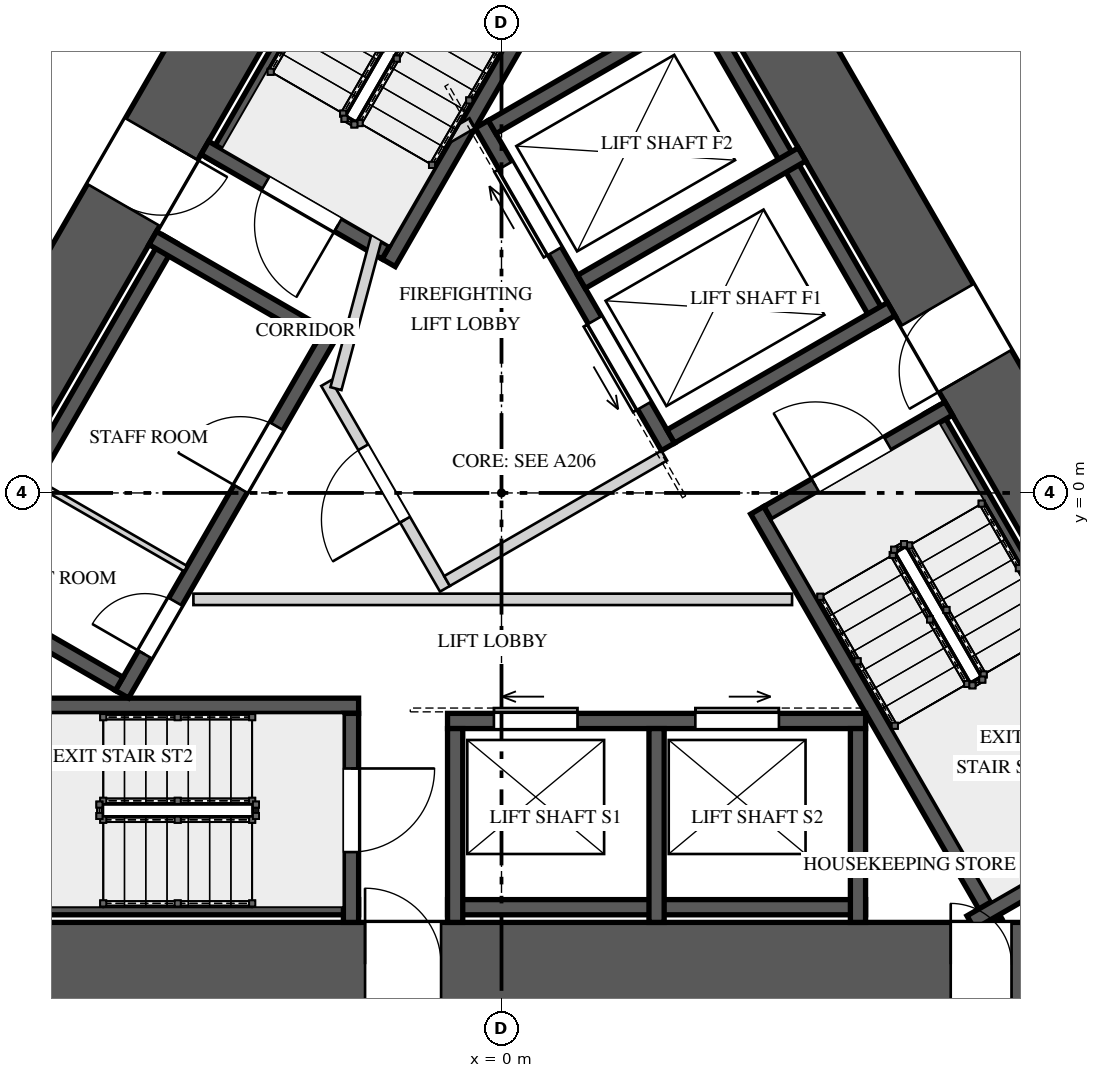
"""IFC4 building model, lengths in metres.
Left out: names, types, materials, properties, quantities, classifications, styles, units other than length and angle.
Written with IfcOpenShell. Run it as: python <this file> out.ifc"""

import sys

from ifc_helpers import new_model, si_unit, direction, frame, frame_2d, origin, place, context, subcontext, project, spatial, rectangle, extrude, element, fill, save


model = new_model("IFC4")
c1 = context("Model", 3, precision=1e-05, world=origin(), true_north=direction((0.0, 1.0)))
c2 = subcontext(c1, "Body", "Model", "MODEL_VIEW")
j1 = project(units=[si_unit("LENGTHUNIT", "METRE"), si_unit("PLANEANGLEUNIT", "RADIAN")], contexts=[c1])
p1 = place(None, origin())
s1 = spatial("IfcSite", under=j1, at=p1, CompositionType="ELEMENT")
p2 = place(p1, origin())
s2 = spatial("IfcBuilding", under=s1, at=p2, CompositionType="ELEMENT")
p3 = place(p2, frame((0.0, 0.0, 25.0)))
s3 = spatial("IfcBuildingStorey", under=s2, at=p3, CompositionType="ELEMENT", Elevation=25.0)
p4 = place(p3, frame((-1.126, 10.45, 0.0), z_axis=(0.0, 0.0, 1.0), x_axis=(-0.500001757713, -0.866024388966, 0.0)))
e1 = element("IfcWall", 1, at=p4, inside=s3, PredefinedType="SHEAR", context=c2, shape_type="SweptSolid", body=[
    extrude(rectangle(XDim=16.974, YDim=1.1, at=frame_2d((8.487, 0.0))), origin(), (0.0, 0.0, 1.0), 5.0),
])
p5 = place(p4, frame((6.692, 0.0, 0.0)))
e2 = element("IfcOpeningElement", 2, at=p5, cuts=e1, PredefinedType="OPENING", context=c2, shape_type="SweptSolid", body=[
    extrude(rectangle(XDim=1.0, YDim=2.4, at=frame_2d((0.5, 1.2))), frame((0.0, 0.56, 0.0), z_axis=(0.0, -1.0, 0.0), x_axis=(1.0, 0.0, 0.0)), (0.0, 0.0, 1.0), 1.12),
])
p6 = place(p3, frame((-8.487, -6.2, 0.0), z_axis=(0.0, 0.0, 1.0), x_axis=(1.0, 0.0, 0.0)))
e3 = element("IfcWall", 3, at=p6, inside=s3, PredefinedType="SHEAR", context=c2, shape_type="SweptSolid", body=[
    extrude(rectangle(XDim=16.974, YDim=1.1, at=frame_2d((8.487, 0.0))), origin(), (0.0, 0.0, 1.0), 5.0),
])
p7 = place(p6, frame((6.692, 0.0, 0.0)))
e4 = element("IfcOpeningElement", 4, at=p7, cuts=e3, PredefinedType="OPENING", context=c2, shape_type="SweptSolid", body=[
    extrude(rectangle(XDim=1.0, YDim=2.4, at=frame_2d((0.5, 1.2))), frame((0.0, 0.56, 0.0), z_axis=(0.0, -1.0, 0.0), x_axis=(1.0, 0.0, 0.0)), (0.0, 0.0, 1.0), 1.12),
])
p8 = place(p6, frame((14.397, 0.0, 0.0)))
e5 = element("IfcOpeningElement", 5, at=p8, cuts=e3, PredefinedType="OPENING", context=c2, shape_type="SweptSolid", body=[
    extrude(rectangle(XDim=0.8, YDim=2.1, at=frame_2d((0.4, 1.05))), frame((0.0, 0.56, 0.0), z_axis=(0.0, -1.0, 0.0), x_axis=(1.0, 0.0, 0.0)), (0.0, 0.0, 1.0), 1.12),
])
p9 = place(p3, frame((9.613, -4.25, 0.0), z_axis=(0.0, 0.0, 1.0), x_axis=(-0.500001757713, 0.866024388966, 0.0)))
e6 = element("IfcWall", 6, at=p9, inside=s3, PredefinedType="SHEAR", context=c2, shape_type="SweptSolid", body=[
    extrude(rectangle(XDim=16.974, YDim=1.1, at=frame_2d((8.487, 0.0))), origin(), (0.0, 0.0, 1.0), 5.0),
])
p10 = place(p9, frame((6.762, 0.0, 0.0)))
e7 = element("IfcOpeningElement", 7, at=p10, cuts=e6, PredefinedType="OPENING", context=c2, shape_type="SweptSolid", body=[
    extrude(rectangle(XDim=1.0, YDim=2.4, at=frame_2d((0.5, 1.2))), frame((0.0, 0.56, 0.0), z_axis=(0.0, -1.0, 0.0), x_axis=(1.0, 0.0, 0.0)), (0.0, 0.0, 1.0), 1.12),
])
p11 = place(p9, frame((13.889, 0.0, 0.0)))
e8 = element("IfcOpeningElement", 8, at=p11, cuts=e6, PredefinedType="OPENING", context=c2, shape_type="SweptSolid", body=[
    extrude(rectangle(XDim=0.8, YDim=2.1, at=frame_2d((0.4, 1.05))), frame((0.0, 0.56, 0.0), z_axis=(0.0, -1.0, 0.0), x_axis=(1.0, 0.0, 0.0)), (0.0, 0.0, 1.0), 1.12),
])
p12 = place(p3, frame((-0.68, 9.722, 0.0), z_axis=(0.0, 0.0, 1.0), x_axis=(-0.49998037582, -0.866036733513, 0.0)))
e9 = element("IfcWall", 9, at=p12, inside=s3, PredefinedType="SOLIDWALL", context=c2, shape_type="SweptSolid", body=[
    extrude(rectangle(XDim=6.2, YDim=0.2, at=frame_2d((3.1, 0.0))), origin(), (0.0, 0.0, 1.0), 4.65),
])
p13 = place(p3, frame((1.646, 8.45, 0.0), z_axis=(0.0, 0.0, 1.0), x_axis=(-0.500006002103, -0.866021938441, 0.0)))
e10 = element("IfcWall", 10, at=p13, inside=s3, PredefinedType="SOLIDWALL", context=c2, shape_type="SweptSolid", body=[
    extrude(rectangle(XDim=6.261, YDim=0.2, at=frame_2d((3.13, 0.0))), origin(), (0.0, 0.0, 1.0), 4.65),
])
p14 = place(p3, frame((-1.521, 3.165, 0.0), z_axis=(0.0, 0.0, 1.0), x_axis=(-0.866027397988, 0.499996545922, 0.0)))
e11 = element("IfcWall", 11, at=p14, inside=s3, PredefinedType="SOLIDWALL", context=c2, shape_type="SweptSolid", body=[
    extrude(rectangle(XDim=2.75, YDim=0.2, at=frame_2d((1.375, 0.0))), origin(), (0.0, 0.0, 1.0), 4.65),
])
p15 = place(p14, frame((0.725, 0.0, 0.0)))
e12 = element("IfcOpeningElement", 12, at=p15, cuts=e11, PredefinedType="OPENING", context=c2, shape_type="SweptSolid", body=[
    extrude(rectangle(XDim=1.1, YDim=2.4, at=frame_2d((0.55, 1.2))), frame((0.0, 0.11, 0.0), z_axis=(0.0, -1.0, 0.0), x_axis=(1.0, 0.0, 0.0)), (0.0, 0.0, 1.0), 0.22),
])
p16 = place(p3, frame((-8.08, -5.45, 0.0), z_axis=(0.0, 0.0, 1.0), x_axis=(1.0, 0.0, 0.0)))
e13 = element("IfcWall", 13, at=p16, inside=s3, PredefinedType="SOLIDWALL", context=c2, shape_type="SweptSolid", body=[
    extrude(rectangle(XDim=6.2, YDim=0.2, at=frame_2d((3.1, 0.0))), origin(), (0.0, 0.0, 1.0), 4.65),
])
p17 = place(p3, frame((-8.141, -2.8, 0.0), z_axis=(0.0, 0.0, 1.0), x_axis=(1.0, 0.0, 0.0)))
e14 = element("IfcWall", 14, at=p17, inside=s3, PredefinedType="SOLIDWALL", context=c2, shape_type="SweptSolid", body=[
    extrude(rectangle(XDim=6.261, YDim=0.2, at=frame_2d((3.13, 0.0))), origin(), (0.0, 0.0, 1.0), 4.65),
])
p18 = place(p3, frame((-1.98, -2.9, 0.0), z_axis=(0.0, 0.0, 1.0), x_axis=(0.0, -1.0, 0.0)))
e15 = element("IfcWall", 15, at=p18, inside=s3, PredefinedType="SOLIDWALL", context=c2, shape_type="SweptSolid", body=[
    extrude(rectangle(XDim=2.75, YDim=0.2, at=frame_2d((1.375, 0.0))), origin(), (0.0, 0.0, 1.0), 4.65),
])
p19 = place(p18, frame((0.725, 0.0, 0.0)))
e16 = element("IfcOpeningElement", 16, at=p19, cuts=e15, PredefinedType="OPENING", context=c2, shape_type="SweptSolid", body=[
    extrude(rectangle(XDim=1.1, YDim=2.4, at=frame_2d((0.55, 1.2))), frame((0.0, 0.11, 0.0), z_axis=(0.0, -1.0, 0.0), x_axis=(1.0, 0.0, 0.0)), (0.0, 0.0, 1.0), 0.22),
])
p20 = place(p3, frame((8.76, -4.272, 0.0), z_axis=(0.0, 0.0, 1.0), x_axis=(-0.49998037582, 0.866036733513, 0.0)))
e17 = element("IfcWall", 17, at=p20, inside=s3, PredefinedType="SOLIDWALL", context=c2, shape_type="SweptSolid", body=[
    extrude(rectangle(XDim=6.2, YDim=0.2, at=frame_2d((3.1, 0.0))), origin(), (0.0, 0.0, 1.0), 4.65),
])
p21 = place(p3, frame((6.495, -5.65, 0.0), z_axis=(0.0, 0.0, 1.0), x_axis=(-0.499976754523, 0.866038824151, 0.0)))
e18 = element("IfcWall", 18, at=p21, inside=s3, PredefinedType="SOLIDWALL", context=c2, shape_type="SweptSolid", body=[
    extrude(rectangle(XDim=6.26, YDim=0.2, at=frame_2d((3.13, 0.0))), origin(), (0.0, 0.0, 1.0), 4.65),
])
p22 = place(p3, frame((6.174, -5.65, 0.0), z_axis=(0.0, 0.0, 1.0), x_axis=(0.866054327916, 0.499949898588, 0.0)))
e19 = element("IfcWall", 19, at=p22, inside=s3, PredefinedType="SOLIDWALL", context=c2, shape_type="SweptSolid", body=[
    extrude(rectangle(XDim=3.128, YDim=0.2, at=frame_2d((1.564, 0.0))), origin(), (0.0, 0.0, 1.0), 4.65),
])
p23 = place(p3, frame((3.501, -0.265, 0.0), z_axis=(0.0, 0.0, 1.0), x_axis=(0.866027397988, 0.499996545922, 0.0)))
e20 = element("IfcWall", 20, at=p23, inside=s3, PredefinedType="SOLIDWALL", context=c2, shape_type="SweptSolid", body=[
    extrude(rectangle(XDim=2.75, YDim=0.2, at=frame_2d((1.375, 0.0))), origin(), (0.0, 0.0, 1.0), 4.65),
])
p24 = place(p23, frame((0.725, 0.0, 0.0)))
e21 = element("IfcOpeningElement", 21, at=p24, cuts=e20, PredefinedType="OPENING", context=c2, shape_type="SweptSolid", body=[
    extrude(rectangle(XDim=1.1, YDim=2.4, at=frame_2d((0.55, 1.2))), frame((0.0, 0.11, 0.0), z_axis=(0.0, -1.0, 0.0), x_axis=(1.0, 0.0, 0.0)), (0.0, 0.0, 1.0), 0.22),
])
p25 = place(p3, frame((-4.993, -2.648, 0.0), z_axis=(0.0, 0.0, 1.0), x_axis=(0.499996545922, 0.866027397988, 0.0)))
e22 = element("IfcWall", 22, at=p25, inside=s3, PredefinedType="SOLIDWALL", context=c2, shape_type="SweptSolid", body=[
    extrude(rectangle(XDim=5.5, YDim=0.2, at=frame_2d((2.75, 0.0))), origin(), (0.0, 0.0, 1.0), 4.65),
])
p26 = place(p25, frame((3.12, 0.0, 0.0)))
e23 = element("IfcOpeningElement", 23, at=p26, cuts=e22, PredefinedType="OPENING", context=c2, shape_type="SweptSolid", body=[
    extrude(rectangle(XDim=0.95, YDim=2.4, at=frame_2d((0.475, 1.2))), frame((0.0, 0.11, 0.0), z_axis=(0.0, -1.0, 0.0), x_axis=(1.0, 0.0, 0.0)), (0.0, 0.0, 1.0), 0.22),
])
p27 = place(p25, frame((0.605, 0.0, 0.0)))
e24 = element("IfcOpeningElement", 24, at=p27, cuts=e22, PredefinedType="OPENING", context=c2, shape_type="SweptSolid", body=[
    extrude(rectangle(XDim=0.8, YDim=2.1, at=frame_2d((0.4, 1.05))), frame((0.0, 0.11, 0.0), z_axis=(0.0, -1.0, 0.0), x_axis=(1.0, 0.0, 0.0)), (0.0, 0.0, 1.0), 0.22),
])
p28 = place(p3, frame((-4.365, 3.34, 0.0), z_axis=(0.0, 0.0, 1.0), x_axis=(-0.499996545922, -0.866027397988, 0.0)))
e25 = element("IfcWall", 25, at=p28, inside=s3, PredefinedType="SOLIDWALL", context=c2, shape_type="SweptSolid", body=[
    extrude(rectangle(XDim=5.5, YDim=0.2, at=frame_2d((2.75, 0.0))), origin(), (0.0, 0.0, 1.0), 4.65),
])
for number, where, z_axis, x_axis in (
    (26, (-2.38, 2.078, 0.0), (0.0, 0.0, 1.0), (-0.866, 0.5, 0.0)),
    (27, (-5.03, -2.512, 0.0), (0.0, 0.0, 1.0), (-0.866, 0.5, 0.0)),
):
    element("IfcWall", number, at=place(p3, frame(where, z_axis=z_axis, x_axis=x_axis)), inside=s3, PredefinedType="SOLIDWALL", context=c2, shape_type="SweptSolid", body=[
        extrude(rectangle(XDim=2.55, YDim=0.2, at=frame_2d((1.275, 0.0))), origin(), (0.0, 0.0, 1.0), 4.65),
    ])
p29 = place(p3, frame((-4.155, -0.996, 0.0), z_axis=(0.0, 0.0, 1.0), x_axis=(-0.866016039709, 0.500016218704, 0.0)))
e28 = element("IfcWall", 28, at=p29, inside=s3, PredefinedType="PARTITIONING", context=c2, shape_type="SweptSolid", body=[
    extrude(rectangle(XDim=2.35, YDim=0.08, at=frame_2d((1.175, 0.0))), origin(), (0.0, 0.0, 1.0), 4.65),
])
p30 = place(p3, frame((-0.71, -3.0, 0.0), z_axis=(0.0, 0.0, 1.0), x_axis=(1.0, 0.0, 0.0)))
e29 = element("IfcWall", 29, at=p30, inside=s3, PredefinedType="SOLIDWALL", context=c2, shape_type="SweptSolid", body=[
    extrude(rectangle(XDim=5.5, YDim=0.2, at=frame_2d((2.75, 0.0))), origin(), (0.0, 0.0, 1.0), 4.65),
])
p31 = place(p30, frame((0.61, 0.0, 0.0)))
e30 = element("IfcOpeningElement", 30, at=p31, cuts=e29, PredefinedType="OPENING", context=c2, shape_type="SweptSolid", body=[
    extrude(rectangle(XDim=1.1, YDim=2.1, at=frame_2d((0.55, 1.05))), frame((0.0, 0.11, 0.0), z_axis=(0.0, -1.0, 0.0), x_axis=(1.0, 0.0, 0.0)), (0.0, 0.0, 1.0), 0.22),
])
p32 = place(p30, frame((3.26, 0.0, 0.0)))
e31 = element("IfcOpeningElement", 31, at=p32, cuts=e29, PredefinedType="OPENING", context=c2, shape_type="SweptSolid", body=[
    extrude(rectangle(XDim=1.1, YDim=2.1, at=frame_2d((0.55, 1.05))), frame((0.0, 0.11, 0.0), z_axis=(0.0, -1.0, 0.0), x_axis=(1.0, 0.0, 0.0)), (0.0, 0.0, 1.0), 0.22),
])
p33 = place(p3, frame((-0.71, -5.45, 0.0), z_axis=(0.0, 0.0, 1.0), x_axis=(1.0, 0.0, 0.0)))
e32 = element("IfcWall", 32, at=p33, inside=s3, PredefinedType="SOLIDWALL", context=c2, shape_type="SweptSolid", body=[
    extrude(rectangle(XDim=5.5, YDim=0.2, at=frame_2d((2.75, 0.0))), origin(), (0.0, 0.0, 1.0), 4.65),
])
for number, where, z_axis, x_axis in (
    (33, (-0.61, -3.1, 0.0), (0.0, 0.0, 1.0), (0.0, -1.0, 0.0)),
    (34, (2.04, -3.1, 0.0), (0.0, 0.0, 1.0), (0.0, -1.0, 0.0)),
    (35, (4.69, -3.1, 0.0), (0.0, 0.0, 1.0), (0.0, -1.0, 0.0)),
):
    element("IfcWall", number, at=place(p3, frame(where, z_axis=z_axis, x_axis=x_axis)), inside=s3, PredefinedType="SOLIDWALL", context=c2, shape_type="SweptSolid", body=[
        extrude(rectangle(XDim=2.55, YDim=0.2, at=frame_2d((1.275, 0.0))), origin(), (0.0, 0.0, 1.0), 4.65),
    ])
p34 = place(p3, frame((2.19, 0.606, 0.0), z_axis=(0.0, 0.0, 1.0), x_axis=(-0.500002801628, 0.866023786258, 0.0)))
e36 = element("IfcWall", 36, at=p34, inside=s3, PredefinedType="SOLIDWALL", context=c2, shape_type="SweptSolid", body=[
    extrude(rectangle(XDim=4.9, YDim=0.2, at=frame_2d((2.45, 0.0))), origin(), (0.0, 0.0, 1.0), 4.65),
])
p35 = place(p34, frame((0.625, 0.0, 0.0)))
e37 = element("IfcOpeningElement", 37, at=p35, cuts=e36, PredefinedType="OPENING", context=c2, shape_type="SweptSolid", body=[
    extrude(rectangle(XDim=1.3, YDim=2.1, at=frame_2d((0.65, 1.05))), frame((0.0, 0.11, 0.0), z_axis=(0.0, -1.0, 0.0), x_axis=(1.0, 0.0, 0.0)), (0.0, 0.0, 1.0), 0.22),
])
p36 = place(p34, frame((2.975, 0.0, 0.0)))
e38 = element("IfcOpeningElement", 38, at=p36, cuts=e36, PredefinedType="OPENING", context=c2, shape_type="SweptSolid", body=[
    extrude(rectangle(XDim=1.3, YDim=2.1, at=frame_2d((0.65, 1.05))), frame((0.0, 0.11, 0.0), z_axis=(0.0, -1.0, 0.0), x_axis=(1.0, 0.0, 0.0)), (0.0, 0.0, 1.0), 0.22),
])
p37 = place(p3, frame((5.005, 2.231, 0.0), z_axis=(0.0, 0.0, 1.0), x_axis=(-0.500002801628, 0.866023786258, 0.0)))
e39 = element("IfcWall", 39, at=p37, inside=s3, PredefinedType="SOLIDWALL", context=c2, shape_type="SweptSolid", body=[
    extrude(rectangle(XDim=4.9, YDim=0.2, at=frame_2d((2.45, 0.0))), origin(), (0.0, 0.0, 1.0), 4.65),
])
p38 = place(p3, frame((2.227, 0.743, 0.0), z_axis=(0.0, 0.0, 1.0), x_axis=(0.866014461049, 0.500018952895, 0.0)))
e40 = element("IfcWall", 40, at=p38, inside=s3, PredefinedType="SOLIDWALL", context=c2, shape_type="SweptSolid", body=[
    extrude(rectangle(XDim=3.35, YDim=0.2, at=frame_2d((1.675, 0.0))), origin(), (0.0, 0.0, 1.0), 4.65),
])
p39 = place(p3, frame((1.052, 2.778, 0.0), z_axis=(0.0, 0.0, 1.0), x_axis=(0.866032680314, 0.499987396469, 0.0)))
e41 = element("IfcWall", 41, at=p39, inside=s3, PredefinedType="SOLIDWALL", context=c2, shape_type="SweptSolid", body=[
    extrude(rectangle(XDim=3.35, YDim=0.2, at=frame_2d((1.675, 0.0))), origin(), (0.0, 0.0, 1.0), 4.65),
])
p40 = place(p3, frame((-0.123, 4.813, 0.0), z_axis=(0.0, 0.0, 1.0), x_axis=(0.866014461049, 0.500018952895, 0.0)))
e42 = element("IfcWall", 42, at=p40, inside=s3, PredefinedType="SOLIDWALL", context=c2, shape_type="SweptSolid", body=[
    extrude(rectangle(XDim=3.35, YDim=0.2, at=frame_2d((1.675, 0.0))), origin(), (0.0, 0.0, 1.0), 4.65),
])
p41 = place(p3, frame((-0.744, -1.261, 0.0), z_axis=(0.0, 0.0, 1.0), x_axis=(-0.500004234368, 0.866022959057, 0.0)))
e43 = element("IfcWall", 43, at=p41, inside=s3, PredefinedType="PARTITIONING", context=c2, shape_type="SweptSolid", body=[
    extrude(rectangle(XDim=3.125, YDim=0.15, at=frame_2d((1.562, 0.0))), origin(), (0.0, 0.0, 1.0), 4.65),
])
p42 = place(p41, frame((1.05, 0.0, 0.0)))
e44 = element("IfcOpeningElement", 44, at=p42, cuts=e43, PredefinedType="OPENING", context=c2, shape_type="SweptSolid", body=[
    extrude(rectangle(XDim=1.1, YDim=2.4, at=frame_2d((0.55, 1.2))), frame((0.0, 0.085, 0.0), z_axis=(0.0, -1.0, 0.0), x_axis=(1.0, 0.0, 0.0)), (0.0, 0.0, 1.0), 0.17),
])
p43 = place(p3, frame((-0.717, -1.159, 0.0), z_axis=(0.0, 0.0, 1.0), x_axis=(0.866008176907, 0.50002983664, 0.0)))
e45 = element("IfcWall", 45, at=p43, inside=s3, PredefinedType="PARTITIONING", context=c2, shape_type="SweptSolid", body=[
    extrude(rectangle(XDim=3.3, YDim=0.15, at=frame_2d((1.65, 0.0))), origin(), (0.0, 0.0, 1.0), 4.65),
])
p44 = place(p3, frame((-2.178, 1.372, 0.0), z_axis=(0.0, 0.0, 1.0), x_axis=(0.258808958833, 0.96592852884, 0.0)))
e46 = element("IfcWall", 46, at=p44, inside=s3, PredefinedType="PARTITIONING", context=c2, shape_type="SweptSolid", body=[
    extrude(rectangle(XDim=2.903, YDim=0.15, at=frame_2d((1.451, 0.0))), origin(), (0.0, 0.0, 1.0), 4.65),
])
p45 = place(p3, frame((-1.51, 4.215, 0.0), z_axis=(0.0, 0.0, 1.0), x_axis=(0.866085525409, 0.49989585183, 0.0)))
e47 = element("IfcWall", 47, at=p45, inside=s3, PredefinedType="PARTITIONING", context=c2, shape_type="SweptSolid", body=[
    extrude(rectangle(XDim=1.3, YDim=0.15, at=frame_2d((0.65, 0.0))), origin(), (0.0, 0.0, 1.0), 4.65),
])
p46 = place(p3, frame((-4.053, -1.4, 0.0), z_axis=(0.0, 0.0, 1.0), x_axis=(1.0, 0.0, 0.0)))
e48 = element("IfcWall", 48, at=p46, inside=s3, PredefinedType="PARTITIONING", context=c2, shape_type="SweptSolid", body=[
    extrude(rectangle(XDim=7.876, YDim=0.15, at=frame_2d((3.938, 0.0))), origin(), (0.0, 0.0, 1.0), 4.65),
])
p47 = place(p15, origin())
e49 = element("IfcDoor", 49, at=p47, inside=s3, OperationType="SINGLE_SWING_RIGHT", PredefinedType="DOOR", context=c2, shape_type="SweptSolid", body=[
    extrude(rectangle(XDim=1.1, YDim=2.4, at=frame_2d((0.55, 1.2))), frame((0.0, 0.025, 0.0), z_axis=(0.0, -1.0, 0.0), x_axis=(1.0, 0.0, 0.0)), (0.0, 0.0, 1.0), 0.05),
])
fill(e12, e49)
p48 = place(p19, origin())
e50 = element("IfcDoor", 50, at=p48, inside=s3, OperationType="SINGLE_SWING_LEFT", PredefinedType="DOOR", context=c2, shape_type="SweptSolid", body=[
    extrude(rectangle(XDim=1.1, YDim=2.4, at=frame_2d((0.55, 1.2))), frame((0.0, 0.025, 0.0), z_axis=(0.0, -1.0, 0.0), x_axis=(1.0, 0.0, 0.0)), (0.0, 0.0, 1.0), 0.05),
])
fill(e16, e50)
p49 = place(p24, origin())
e51 = element("IfcDoor", 51, at=p49, inside=s3, OperationType="SINGLE_SWING_RIGHT", PredefinedType="DOOR", context=c2, shape_type="SweptSolid", body=[
    extrude(rectangle(XDim=1.1, YDim=2.4, at=frame_2d((0.55, 1.2))), frame((0.0, 0.025, 0.0), z_axis=(0.0, -1.0, 0.0), x_axis=(1.0, 0.0, 0.0)), (0.0, 0.0, 1.0), 0.05),
])
fill(e21, e51)
p50 = place(p26, origin())
e52 = element("IfcDoor", 52, at=p50, inside=s3, OperationType="SINGLE_SWING_LEFT", PredefinedType="DOOR", context=c2, shape_type="SweptSolid", body=[
    extrude(rectangle(XDim=0.95, YDim=2.4, at=frame_2d((0.475, 1.2))), frame((0.0, 0.025, 0.0), z_axis=(0.0, -1.0, 0.0), x_axis=(1.0, 0.0, 0.0)), (0.0, 0.0, 1.0), 0.05),
])
fill(e23, e52)
p51 = place(p27, origin())
e53 = element("IfcDoor", 53, at=p51, inside=s3, OperationType="SINGLE_SWING_RIGHT", PredefinedType="DOOR", context=c2, shape_type="SweptSolid", body=[
    extrude(rectangle(XDim=0.8, YDim=2.1, at=frame_2d((0.4, 1.05))), frame((0.0, 0.025, 0.0), z_axis=(0.0, -1.0, 0.0), x_axis=(1.0, 0.0, 0.0)), (0.0, 0.0, 1.0), 0.05),
])
fill(e24, e53)
p52 = place(p31, origin())
e54 = element("IfcDoor", 54, at=p52, inside=s3, OperationType="SLIDING_TO_LEFT", PredefinedType="DOOR", context=c2, shape_type="SweptSolid", body=[
    extrude(rectangle(XDim=1.1, YDim=2.1, at=frame_2d((0.55, 1.05))), frame((0.0, 0.025, 0.0), z_axis=(0.0, -1.0, 0.0), x_axis=(1.0, 0.0, 0.0)), (0.0, 0.0, 1.0), 0.05),
])
fill(e30, e54)
p53 = place(p32, origin())
e55 = element("IfcDoor", 55, at=p53, inside=s3, OperationType="SLIDING_TO_RIGHT", PredefinedType="DOOR", context=c2, shape_type="SweptSolid", body=[
    extrude(rectangle(XDim=1.1, YDim=2.1, at=frame_2d((0.55, 1.05))), frame((0.0, 0.025, 0.0), z_axis=(0.0, -1.0, 0.0), x_axis=(1.0, 0.0, 0.0)), (0.0, 0.0, 1.0), 0.05),
])
fill(e31, e55)
p54 = place(p35, origin())
e56 = element("IfcDoor", 56, at=p54, inside=s3, OperationType="SLIDING_TO_LEFT", PredefinedType="DOOR", context=c2, shape_type="SweptSolid", body=[
    extrude(rectangle(XDim=1.3, YDim=2.1, at=frame_2d((0.65, 1.05))), frame((0.0, 0.025, 0.0), z_axis=(0.0, -1.0, 0.0), x_axis=(1.0, 0.0, 0.0)), (0.0, 0.0, 1.0), 0.05),
])
fill(e37, e56)
p55 = place(p36, origin())
e57 = element("IfcDoor", 57, at=p55, inside=s3, OperationType="SLIDING_TO_RIGHT", PredefinedType="DOOR", context=c2, shape_type="SweptSolid", body=[
    extrude(rectangle(XDim=1.3, YDim=2.1, at=frame_2d((0.65, 1.05))), frame((0.0, 0.025, 0.0), z_axis=(0.0, -1.0, 0.0), x_axis=(1.0, 0.0, 0.0)), (0.0, 0.0, 1.0), 0.05),
])
fill(e38, e57)
p56 = place(p42, origin())
e58 = element("IfcDoor", 58, at=p56, inside=s3, OperationType="SINGLE_SWING_LEFT", PredefinedType="DOOR", context=c2, shape_type="SweptSolid", body=[
    extrude(rectangle(XDim=1.1, YDim=2.4, at=frame_2d((0.55, 1.2))), frame((0.0, 0.025, 0.0), z_axis=(0.0, -1.0, 0.0), x_axis=(1.0, 0.0, 0.0)), (0.0, 0.0, 1.0), 0.05),
])
fill(e44, e58)
p57 = place(p5, origin())
e59 = element("IfcDoor", 59, at=p57, inside=s3, OperationType="SINGLE_SWING_RIGHT", PredefinedType="DOOR", context=c2, shape_type="SweptSolid", body=[
    extrude(rectangle(XDim=1.0, YDim=2.4, at=frame_2d((0.5, 1.2))), frame((0.0, 0.025, 0.0), z_axis=(0.0, -1.0, 0.0), x_axis=(1.0, 0.0, 0.0)), (0.0, 0.0, 1.0), 0.05),
])
fill(e2, e59)
p58 = place(p7, origin())
e60 = element("IfcDoor", 60, at=p58, inside=s3, OperationType="SINGLE_SWING_LEFT", PredefinedType="DOOR", context=c2, shape_type="SweptSolid", body=[
    extrude(rectangle(XDim=1.0, YDim=2.4, at=frame_2d((0.5, 1.2))), frame((0.0, 0.025, 0.0), z_axis=(0.0, -1.0, 0.0), x_axis=(1.0, 0.0, 0.0)), (0.0, 0.0, 1.0), 0.05),
])
fill(e4, e60)
p59 = place(p10, origin())
e61 = element("IfcDoor", 61, at=p59, inside=s3, OperationType="SINGLE_SWING_RIGHT", PredefinedType="DOOR", context=c2, shape_type="SweptSolid", body=[
    extrude(rectangle(XDim=1.0, YDim=2.4, at=frame_2d((0.5, 1.2))), frame((0.0, 0.025, 0.0), z_axis=(0.0, -1.0, 0.0), x_axis=(1.0, 0.0, 0.0)), (0.0, 0.0, 1.0), 0.05),
])
fill(e7, e61)
p60 = place(p8, origin())
e62 = element("IfcDoor", 62, at=p60, inside=s3, OperationType="SINGLE_SWING_LEFT", PredefinedType="DOOR", context=c2, shape_type="SweptSolid", body=[
    extrude(rectangle(XDim=0.8, YDim=2.1, at=frame_2d((0.4, 1.05))), frame((0.0, 0.025, 0.0), z_axis=(0.0, -1.0, 0.0), x_axis=(1.0, 0.0, 0.0)), (0.0, 0.0, 1.0), 0.05),
])
fill(e5, e62)
save(model, sys.argv[1])
